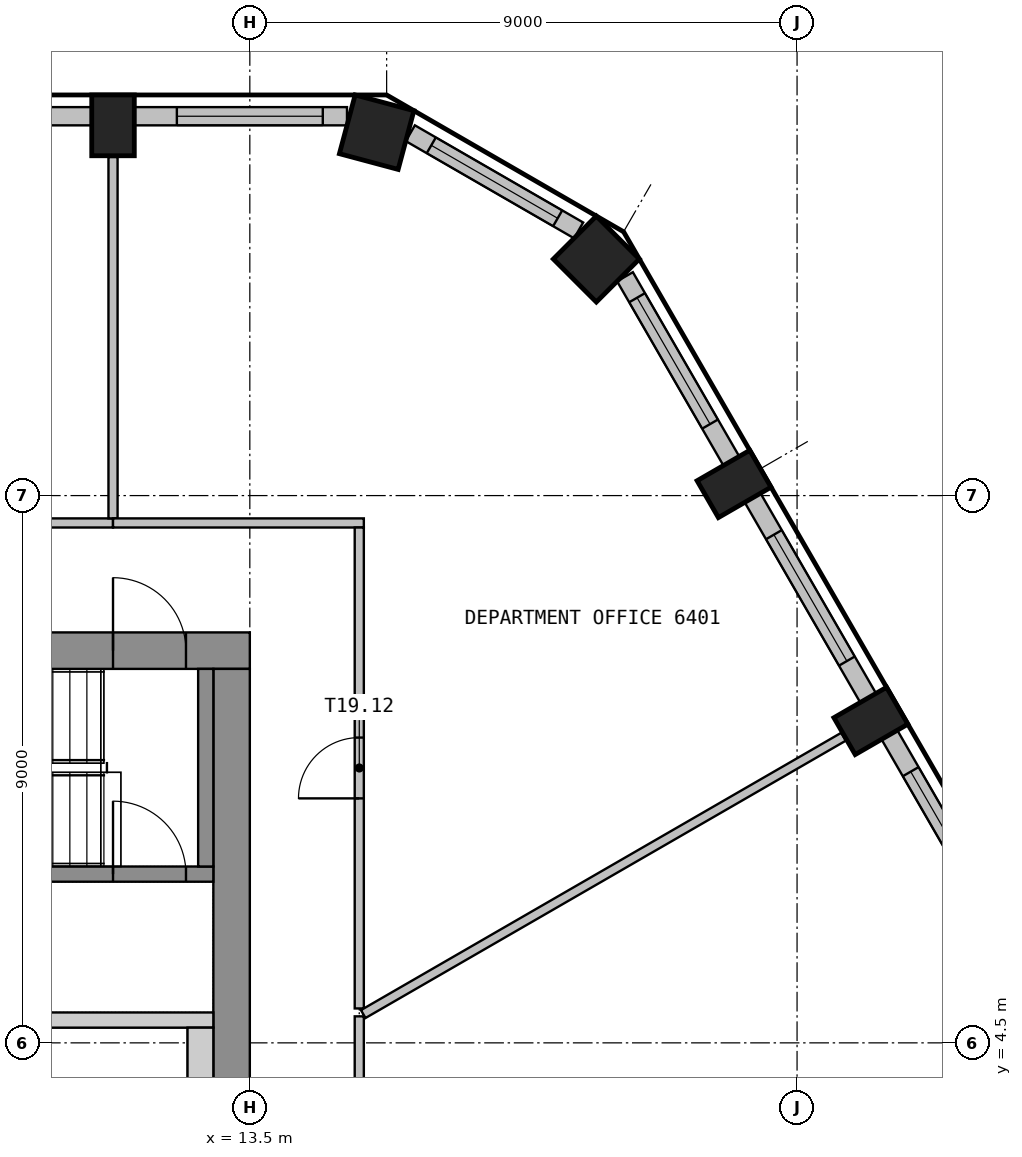
"""IFC4 building model, lengths in metres.
Left out: names, types, materials, properties, quantities, classifications, styles, units other than length and angle.
Written with IfcOpenShell. Run it as: python <this file> out.ifc"""

import sys

from ifc_helpers import new_model, si_unit, direction, frame, frame_2d, origin, origin_2d, place, context, subcontext, project, spatial, polyline, rectangle, outline, extrude, element, fill, save


model = new_model("IFC4")
c1 = context("Model", 3, precision=1e-05, world=origin(), true_north=direction((0.0, 1.0)))
c2 = subcontext(c1, "Body", "Model", "MODEL_VIEW")
j1 = project(units=[si_unit("LENGTHUNIT", "METRE"), si_unit("PLANEANGLEUNIT", "RADIAN")], contexts=[c1])
p1 = place(None, origin())
s1 = spatial("IfcSite", under=j1, at=p1, CompositionType="ELEMENT")
p2 = place(p1, origin())
s2 = spatial("IfcBuilding", under=s1, at=p2, CompositionType="ELEMENT")
p3 = place(p2, frame((0.0, 0.0, 258.6)))
s3 = spatial("IfcBuildingStorey", under=s2, at=p3, CompositionType="ELEMENT", Elevation=258.6)
for number, where, z_axis, x_axis in (
    (1, (23.714, 9.794, 0.0), (0.0, 0.0, 1.0), (-0.5, 0.866, 0.0)),
    (2, (21.464, 13.691, 0.0), (0.0, 0.0, 1.0), (-0.5, 0.866, 0.0)),
):
    element("IfcColumn", number, at=place(p3, frame(where, z_axis=z_axis, x_axis=x_axis)), inside=s3, PredefinedType="COLUMN", context=c2, shape_type="SweptSolid", body=[
        extrude(rectangle(XDim=0.7, YDim=1.0, at=origin_2d()), origin(), (0.0, 0.0, 1.0), 3.575),
    ])
for number, where, z_axis, x_axis in (
    (3, (19.199, 17.39, 0.0), (0.0, 0.0, 1.0), (-0.707, 0.707, 0.0)),
    (4, (15.586, 19.476, 0.0), (0.0, 0.0, 1.0), (-0.966, 0.259, 0.0)),
):
    element("IfcColumn", number, at=place(p3, frame(where, z_axis=z_axis, x_axis=x_axis)), inside=s3, PredefinedType="COLUMN", context=c2, shape_type="SweptSolid", body=[
        extrude(rectangle(XDim=1.0, YDim=1.0, at=origin_2d()), origin(), (0.0, 0.0, 1.0), 3.575),
    ])
p4 = place(p3, frame((11.25, 19.588, 0.0), z_axis=(0.0, 0.0, 1.0), x_axis=(-1.0, 0.0, 0.0)))
e5 = element("IfcColumn", 5, at=p4, inside=s3, PredefinedType="COLUMN", context=c2, shape_type="SweptSolid", body=[
    extrude(rectangle(XDim=0.7, YDim=1.0, at=origin_2d()), origin(), (0.0, 0.0, 1.0), 3.575),
])
p5 = place(p3, frame((25.919, 6.276, 0.0), z_axis=(0.0, 0.0, 1.0), x_axis=(-0.499982058975, 0.866035761792, 0.0)))
e6 = element("IfcWall", 6, at=p5, inside=s3, PredefinedType="SOLIDWALL", context=c2, shape_type="SweptSolid", body=[
    extrude(rectangle(XDim=3.799, YDim=0.3, at=frame_2d((1.899, 0.0))), origin(), (0.0, 0.0, 1.0), 3.575),
])
p6 = place(p5, frame((0.699, 0.0, 0.9)))
e7 = element("IfcOpeningElement", 7, at=p6, cuts=e6, PredefinedType="OPENING", context=c2, shape_type="SweptSolid", body=[
    extrude(rectangle(XDim=2.4, YDim=2.1, at=frame_2d((1.2, 1.05))), frame((0.0, 0.16, 0.0), z_axis=(0.0, -1.0, 0.0), x_axis=(1.0, 0.0, 0.0)), (0.0, 0.0, 1.0), 0.32),
])
p7 = place(p3, frame((23.669, 10.173, 0.0), z_axis=(0.0, 0.0, 1.0), x_axis=(-0.499982058975, 0.866035761792, 0.0)))
e8 = element("IfcWall", 8, at=p7, inside=s3, PredefinedType="SOLIDWALL", context=c2, shape_type="SweptSolid", body=[
    extrude(rectangle(XDim=3.799, YDim=0.3, at=frame_2d((1.899, 0.0))), origin(), (0.0, 0.0, 1.0), 3.575),
])
p8 = place(p7, frame((0.699, 0.0, 0.9)))
e9 = element("IfcOpeningElement", 9, at=p8, cuts=e8, PredefinedType="OPENING", context=c2, shape_type="SweptSolid", body=[
    extrude(rectangle(XDim=2.4, YDim=2.1, at=frame_2d((1.2, 1.05))), frame((0.0, 0.16, 0.0), z_axis=(0.0, -1.0, 0.0), x_axis=(1.0, 0.0, 0.0)), (0.0, 0.0, 1.0), 0.32),
])
p9 = place(p3, frame((21.419, 14.07, 0.0), z_axis=(0.0, 0.0, 1.0), x_axis=(-0.499960102815, 0.866048437209, 0.0)))
e10 = element("IfcWall", 10, at=p9, inside=s3, PredefinedType="SOLIDWALL", context=c2, shape_type="SweptSolid", body=[
    extrude(rectangle(XDim=3.498, YDim=0.3, at=frame_2d((1.749, 0.0))), origin(), (0.0, 0.0, 1.0), 3.575),
])
p10 = place(p9, frame((0.699, 0.0, 0.9)))
e11 = element("IfcOpeningElement", 11, at=p10, cuts=e10, PredefinedType="OPENING", context=c2, shape_type="SweptSolid", body=[
    extrude(rectangle(XDim=2.4, YDim=2.1, at=frame_2d((1.2, 1.05))), frame((0.0, 0.16, 0.0), z_axis=(0.0, -1.0, 0.0), x_axis=(1.0, 0.0, 0.0)), (0.0, 0.0, 1.0), 0.32),
])
p11 = place(p3, frame((18.908, 17.861, 0.0), z_axis=(0.0, 0.0, 1.0), x_axis=(-0.866025316205, 0.500000151692, 0.0)))
e12 = element("IfcWall", 12, at=p11, inside=s3, PredefinedType="SOLIDWALL", context=c2, shape_type="SweptSolid", body=[
    extrude(rectangle(XDim=3.196, YDim=0.3, at=frame_2d((1.598, 0.0))), origin(), (0.0, 0.0, 1.0), 3.575),
])
p12 = place(p11, frame((0.398, 0.0, 0.9)))
e13 = element("IfcOpeningElement", 13, at=p12, cuts=e12, PredefinedType="OPENING", context=c2, shape_type="SweptSolid", body=[
    extrude(rectangle(XDim=2.4, YDim=2.1, at=frame_2d((1.2, 1.05))), frame((0.0, 0.16, 0.0), z_axis=(0.0, -1.0, 0.0), x_axis=(1.0, 0.0, 0.0)), (0.0, 0.0, 1.0), 0.32),
])
p13 = place(p3, frame((15.098, 19.739, 0.0), z_axis=(0.0, 0.0, 1.0), x_axis=(-1.0, 0.0, 0.0)))
e14 = element("IfcWall", 14, at=p13, inside=s3, PredefinedType="SOLIDWALL", context=c2, shape_type="SweptSolid", body=[
    extrude(rectangle(XDim=3.498, YDim=0.3, at=frame_2d((1.749, 0.0))), origin(), (0.0, 0.0, 1.0), 3.575),
])
p14 = place(p13, frame((0.398, 0.0, 0.9)))
e15 = element("IfcOpeningElement", 15, at=p14, cuts=e14, PredefinedType="OPENING", context=c2, shape_type="SweptSolid", body=[
    extrude(rectangle(XDim=2.4, YDim=2.1, at=frame_2d((1.2, 1.05))), frame((0.0, 0.16, 0.0), z_axis=(0.0, -1.0, 0.0), x_axis=(1.0, 0.0, 0.0)), (0.0, 0.0, 1.0), 0.32),
])
p15 = place(p3, frame((10.899, 19.739, 0.0), z_axis=(0.0, 0.0, 1.0), x_axis=(-1.0, 0.0, 0.0)))
e16 = element("IfcWall", 16, at=p15, inside=s3, PredefinedType="SOLIDWALL", context=c2, shape_type="SweptSolid", body=[
    extrude(rectangle(XDim=3.799, YDim=0.3, at=frame_2d((1.899, 0.0))), origin(), (0.0, 0.0, 1.0), 3.575),
])
p16 = place(p15, frame((0.699, 0.0, 0.9)))
e17 = element("IfcOpeningElement", 17, at=p16, cuts=e16, PredefinedType="OPENING", context=c2, shape_type="SweptSolid", body=[
    extrude(rectangle(XDim=2.4, YDim=2.1, at=frame_2d((1.2, 1.05))), frame((0.0, 0.16, 0.0), z_axis=(0.0, -1.0, 0.0), x_axis=(1.0, 0.0, 0.0)), (0.0, 0.0, 1.0), 0.32),
])
p17 = place(p3, frame((-13.5, 10.95, 0.0), z_axis=(0.0, 0.0, 1.0), x_axis=(1.0, 0.0, 0.0)))
e18 = element("IfcWall", 18, at=p17, inside=s3, PredefinedType="SHEAR", context=c2, shape_type="SweptSolid", body=[
    extrude(rectangle(XDim=27.0, YDim=0.6, at=frame_2d((13.5, 0.0))), origin(), (0.0, 0.0, 1.0), 3.575),
])
p18 = place(p17, frame((12.3, 0.0, 0.0)))
e19 = element("IfcOpeningElement", 19, at=p18, cuts=e18, PredefinedType="OPENING", context=c2, shape_type="SweptSolid", body=[
    extrude(rectangle(XDim=2.4, YDim=2.1, at=frame_2d((1.2, 1.05))), frame((0.0, 0.31, 0.0), z_axis=(0.0, -1.0, 0.0), x_axis=(1.0, 0.0, 0.0)), (0.0, 0.0, 1.0), 0.62),
])
p19 = place(p17, frame((1.05, 0.0, 0.0)))
e20 = element("IfcOpeningElement", 20, at=p19, cuts=e18, PredefinedType="OPENING", context=c2, shape_type="SweptSolid", body=[
    extrude(rectangle(XDim=1.2, YDim=2.1, at=frame_2d((0.6, 1.05))), frame((0.0, 0.31, 0.0), z_axis=(0.0, -1.0, 0.0), x_axis=(1.0, 0.0, 0.0)), (0.0, 0.0, 1.0), 0.62),
])
p20 = place(p17, frame((24.75, 0.0, 0.0)))
e21 = element("IfcOpeningElement", 21, at=p20, cuts=e18, PredefinedType="OPENING", context=c2, shape_type="SweptSolid", body=[
    extrude(rectangle(XDim=1.2, YDim=2.1, at=frame_2d((0.6, 1.05))), frame((0.0, 0.31, 0.0), z_axis=(0.0, -1.0, 0.0), x_axis=(1.0, 0.0, 0.0)), (0.0, 0.0, 1.0), 0.62),
])
p21 = place(p3, frame((13.2, -10.65, 0.0), z_axis=(0.0, 0.0, 1.0), x_axis=(0.0, 1.0, 0.0)))
e22 = element("IfcWall", 22, at=p21, inside=s3, PredefinedType="SHEAR", context=c2, shape_type="SweptSolid", body=[
    extrude(rectangle(XDim=21.3, YDim=0.6, at=frame_2d((10.65, 0.0))), origin(), (0.0, 0.0, 1.0), 3.575),
])
p22 = place(p21, frame((9.45, 0.0, 0.0)))
e23 = element("IfcOpeningElement", 23, at=p22, cuts=e22, PredefinedType="OPENING", context=c2, shape_type="SweptSolid", body=[
    extrude(rectangle(XDim=2.4, YDim=2.1, at=frame_2d((1.2, 1.05))), frame((0.0, 0.31, 0.0), z_axis=(0.0, -1.0, 0.0), x_axis=(1.0, 0.0, 0.0)), (0.0, 0.0, 1.0), 0.62),
])
p23 = place(p3, origin())
e24 = element("IfcWall", 24, at=p23, inside=s3, PredefinedType="SHEAR", context=c2, shape_type="SweptSolid", body=[
    extrude(outline(polyline([(9.675, 4.75), (12.9, 4.75), (12.9, 5.0), (9.675, 5.0), (9.675, 4.75)])), origin(), (0.0, 0.0, 1.0), 3.575),
])
p24 = place(p3, origin())
e25 = element("IfcWall", 25, at=p24, inside=s3, PredefinedType="SHEAR", context=c2, shape_type="SweptSolid", body=[
    extrude(outline(polyline([(12.475, 2.05), (12.9, 2.05), (12.9, 4.75), (12.475, 4.75), (12.475, 2.05)])), origin(), (0.0, 0.0, 1.0), 3.575),
])
p25 = place(p3, frame((2.8, 7.275, 0.0), z_axis=(0.0, 0.0, 1.0), x_axis=(1.0, 0.0, 0.0)))
e26 = element("IfcWall", 26, at=p25, inside=s3, PredefinedType="SHEAR", context=c2, shape_type="SweptSolid", body=[
    extrude(rectangle(XDim=10.1, YDim=0.25, at=frame_2d((5.05, 0.0))), origin(), (0.0, 0.0, 1.0), 3.575),
])
p26 = place(p25, frame((8.45, 0.0, 0.0)))
e27 = element("IfcOpeningElement", 27, at=p26, cuts=e26, PredefinedType="OPENING", context=c2, shape_type="SweptSolid", body=[
    extrude(rectangle(XDim=1.2, YDim=2.1, at=frame_2d((0.6, 1.05))), frame((0.0, 0.135, 0.0), z_axis=(0.0, -1.0, 0.0), x_axis=(1.0, 0.0, 0.0)), (0.0, 0.0, 1.0), 0.27),
])
p27 = place(p3, frame((12.775, 7.4, 0.0), z_axis=(0.0, 0.0, 1.0), x_axis=(0.0, 1.0, 0.0)))
e28 = element("IfcWall", 28, at=p27, inside=s3, PredefinedType="SHEAR", context=c2, shape_type="SweptSolid", body=[
    extrude(rectangle(XDim=3.25, YDim=0.25, at=frame_2d((1.625, 0.0))), origin(), (0.0, 0.0, 1.0), 3.575),
])
p28 = place(p3, frame((11.25, 13.05, 0.0), z_axis=(0.0, 0.0, 1.0), x_axis=(-1.0, 0.0, 0.0)))
e29 = element("IfcWall", 29, at=p28, inside=s3, PredefinedType="PARTITIONING", context=c2, shape_type="SweptSolid", body=[
    extrude(rectangle(XDim=13.5, YDim=0.15, at=frame_2d((6.75, 0.0))), origin(), (0.0, 0.0, 1.0), 3.575),
])
p29 = place(p28, frame((6.25, 0.0, 0.0)))
e30 = element("IfcOpeningElement", 30, at=p29, cuts=e29, PredefinedType="OPENING", context=c2, shape_type="SweptSolid", body=[
    extrude(rectangle(XDim=1.0, YDim=2.1, at=frame_2d((0.5, 1.05))), frame((0.0, 0.085, 0.0), z_axis=(0.0, -1.0, 0.0), x_axis=(1.0, 0.0, 0.0)), (0.0, 0.0, 1.0), 0.17),
])
p30 = place(p3, frame((11.25, 19.069, 0.0), z_axis=(0.0, 0.0, 1.0), x_axis=(0.0, -1.0, 0.0)))
e31 = element("IfcWall", 31, at=p30, inside=s3, PredefinedType="PARTITIONING", context=c2, shape_type="SweptSolid", body=[
    extrude(rectangle(XDim=5.944, YDim=0.15, at=frame_2d((2.972, 0.0))), origin(), (0.0, 0.0, 1.0), 3.575),
])
p31 = place(p3, frame((15.375, 13.05, 0.0), z_axis=(0.0, 0.0, 1.0), x_axis=(-1.0, 0.0, 0.0)))
e32 = element("IfcWall", 32, at=p31, inside=s3, PredefinedType="PARTITIONING", context=c2, shape_type="SweptSolid", body=[
    extrude(rectangle(XDim=4.125, YDim=0.15, at=frame_2d((2.062, 0.0))), origin(), (0.0, 0.0, 1.0), 3.575),
])
p32 = place(p3, frame((15.3, -1.326, 0.0), z_axis=(0.0, 0.0, 1.0), x_axis=(0.0, 1.0, 0.0)))
e33 = element("IfcWall", 33, at=p32, inside=s3, PredefinedType="PARTITIONING", context=c2, shape_type="SweptSolid", body=[
    extrude(rectangle(XDim=6.262, YDim=0.15, at=frame_2d((3.131, 0.0))), origin(), (0.0, 0.0, 1.0), 3.575),
])
p33 = place(p32, frame((2.631, 0.0, 0.0)))
e34 = element("IfcOpeningElement", 34, at=p33, cuts=e33, PredefinedType="OPENING", context=c2, shape_type="SweptSolid", body=[
    extrude(rectangle(XDim=1.0, YDim=2.1, at=frame_2d((0.5, 1.05))), frame((0.0, 0.085, 0.0), z_axis=(0.0, -1.0, 0.0), x_axis=(1.0, 0.0, 0.0)), (0.0, 0.0, 1.0), 0.17),
])
p34 = place(p3, frame((15.3, 5.066, 0.0), z_axis=(0.0, 0.0, 1.0), x_axis=(0.0, 1.0, 0.0)))
e35 = element("IfcWall", 35, at=p34, inside=s3, PredefinedType="PARTITIONING", context=c2, shape_type="SweptSolid", body=[
    extrude(rectangle(XDim=7.909, YDim=0.15, at=frame_2d((3.955, 0.0))), origin(), (0.0, 0.0, 1.0), 3.575),
])
p35 = place(p34, frame((3.455, 0.0, 0.0)))
e36 = element("IfcOpeningElement", 36, at=p35, cuts=e35, PredefinedType="OPENING", context=c2, shape_type="SweptSolid", body=[
    extrude(rectangle(XDim=1.0, YDim=2.1, at=frame_2d((0.5, 1.05))), frame((0.0, 0.085, 0.0), z_axis=(0.0, -1.0, 0.0), x_axis=(1.0, 0.0, 0.0)), (0.0, 0.0, 1.0), 0.17),
])
p36 = place(p3, frame((23.264, 9.534, 0.0), z_axis=(0.0, 0.0, 1.0), x_axis=(-0.866009068046, -0.500028293261, 0.0)))
e37 = element("IfcWall", 37, at=p36, inside=s3, PredefinedType="PARTITIONING", context=c2, shape_type="SweptSolid", body=[
    extrude(rectangle(XDim=9.121, YDim=0.15, at=frame_2d((4.561, 0.0))), origin(), (0.0, 0.0, 1.0), 3.575),
])
p37 = place(p6, origin())
e38 = element("IfcWindow", 38, at=p37, inside=s3, PartitioningType="SINGLE_PANEL", PredefinedType="WINDOW", context=c2, shape_type="SweptSolid", body=[
    extrude(rectangle(XDim=2.4, YDim=2.1, at=frame_2d((1.2, 1.05))), frame((0.0, 0.03, 0.0), z_axis=(0.0, -1.0, 0.0), x_axis=(1.0, 0.0, 0.0)), (0.0, 0.0, 1.0), 0.06),
])
fill(e7, e38)
p38 = place(p8, origin())
e39 = element("IfcWindow", 39, at=p38, inside=s3, PartitioningType="SINGLE_PANEL", PredefinedType="WINDOW", context=c2, shape_type="SweptSolid", body=[
    extrude(rectangle(XDim=2.4, YDim=2.1, at=frame_2d((1.2, 1.05))), frame((0.0, 0.03, 0.0), z_axis=(0.0, -1.0, 0.0), x_axis=(1.0, 0.0, 0.0)), (0.0, 0.0, 1.0), 0.06),
])
fill(e9, e39)
p39 = place(p10, origin())
e40 = element("IfcWindow", 40, at=p39, inside=s3, PartitioningType="SINGLE_PANEL", PredefinedType="WINDOW", context=c2, shape_type="SweptSolid", body=[
    extrude(rectangle(XDim=2.4, YDim=2.1, at=frame_2d((1.2, 1.05))), frame((0.0, 0.03, 0.0), z_axis=(0.0, -1.0, 0.0), x_axis=(1.0, 0.0, 0.0)), (0.0, 0.0, 1.0), 0.06),
])
fill(e11, e40)
p40 = place(p12, origin())
e41 = element("IfcWindow", 41, at=p40, inside=s3, PartitioningType="SINGLE_PANEL", PredefinedType="WINDOW", context=c2, shape_type="SweptSolid", body=[
    extrude(rectangle(XDim=2.4, YDim=2.1, at=frame_2d((1.2, 1.05))), frame((0.0, 0.03, 0.0), z_axis=(0.0, -1.0, 0.0), x_axis=(1.0, 0.0, 0.0)), (0.0, 0.0, 1.0), 0.06),
])
fill(e13, e41)
p41 = place(p14, origin())
e42 = element("IfcWindow", 42, at=p41, inside=s3, PartitioningType="SINGLE_PANEL", PredefinedType="WINDOW", context=c2, shape_type="SweptSolid", body=[
    extrude(rectangle(XDim=2.4, YDim=2.1, at=frame_2d((1.2, 1.05))), frame((0.0, 0.03, 0.0), z_axis=(0.0, -1.0, 0.0), x_axis=(1.0, 0.0, 0.0)), (0.0, 0.0, 1.0), 0.06),
])
fill(e15, e42)
p42 = place(p20, origin())
e43 = element("IfcDoor", 43, at=p42, inside=s3, OperationType="SINGLE_SWING_RIGHT", PredefinedType="DOOR", context=c2, shape_type="SweptSolid", body=[
    extrude(rectangle(XDim=1.2, YDim=2.1, at=frame_2d((0.6, 1.05))), frame((0.0, 0.025, 0.0), z_axis=(0.0, -1.0, 0.0), x_axis=(1.0, 0.0, 0.0)), (0.0, 0.0, 1.0), 0.05),
])
fill(e21, e43)
p43 = place(p26, origin())
e44 = element("IfcDoor", 44, at=p43, inside=s3, OperationType="SINGLE_SWING_LEFT", PredefinedType="DOOR", context=c2, shape_type="SweptSolid", body=[
    extrude(rectangle(XDim=1.2, YDim=2.1, at=frame_2d((0.6, 1.05))), frame((0.0, 0.025, 0.0), z_axis=(0.0, -1.0, 0.0), x_axis=(1.0, 0.0, 0.0)), (0.0, 0.0, 1.0), 0.05),
])
fill(e27, e44)
p44 = place(p35, origin())
e45 = element("IfcDoor", 45, at=p44, inside=s3, OperationType="SINGLE_SWING_RIGHT", PredefinedType="DOOR", context=c2, shape_type="SweptSolid", body=[
    extrude(rectangle(XDim=1.0, YDim=2.1, at=frame_2d((0.5, 1.05))), frame((0.0, 0.025, 0.0), z_axis=(0.0, -1.0, 0.0), x_axis=(1.0, 0.0, 0.0)), (0.0, 0.0, 1.0), 0.05),
])
fill(e36, e45)
save(model, sys.argv[1])
